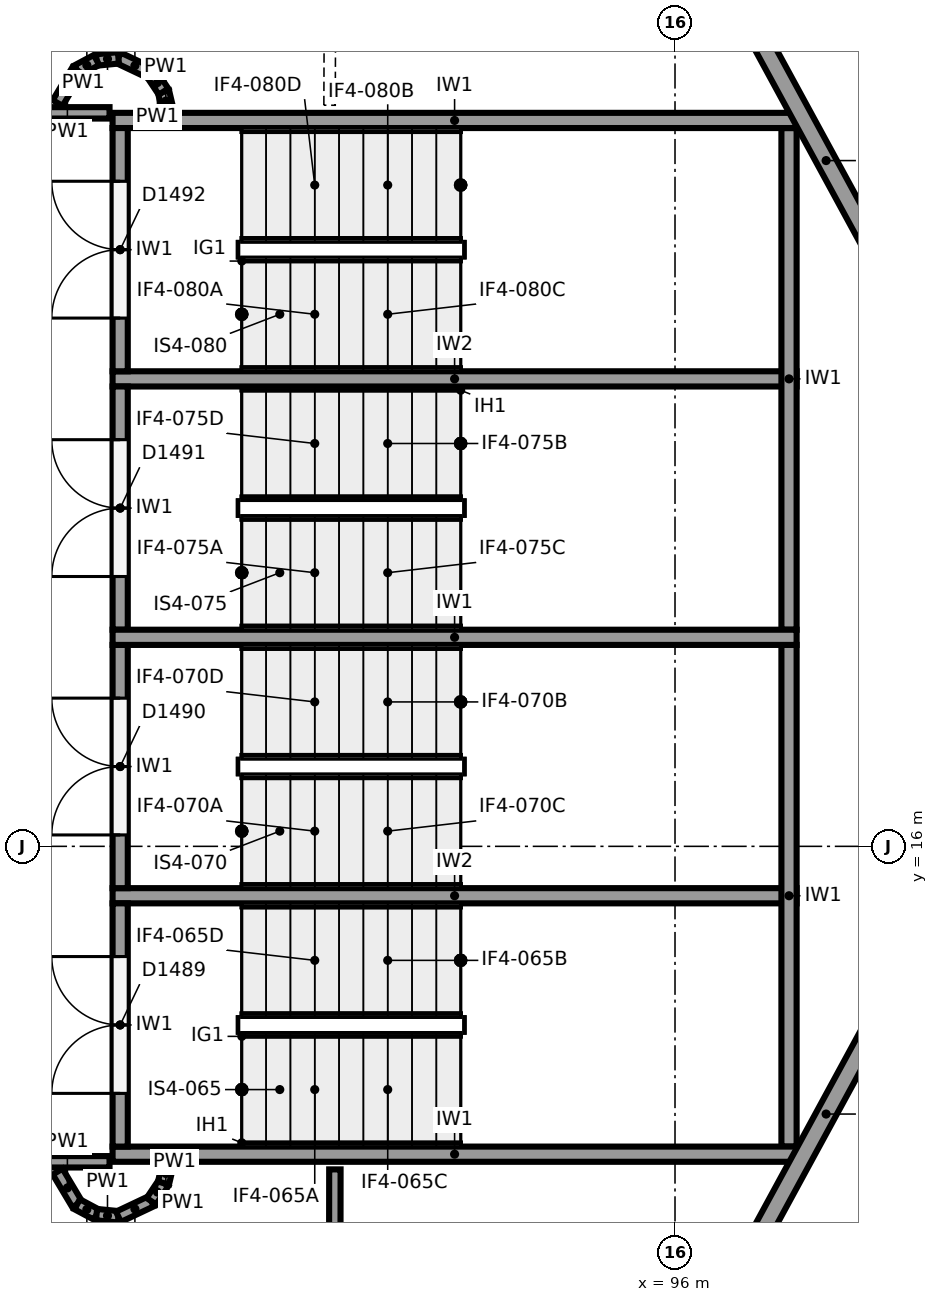
"""IFC4 building model, lengths in metres.
Left out: names, types, materials, properties, quantities, classifications, styles, units other than length and angle.
Written with IfcOpenShell. Run it as: python <this file> out.ifc"""

import sys

from ifc_helpers import new_model, si_unit, direction, frame, frame_2d, origin, place, context, subcontext, project, spatial, rectangle, extrude, element, fill, save


model = new_model("IFC4")
c1 = context("Model", 3, precision=1e-05, world=origin(), true_north=direction((0.0, 1.0)))
c2 = subcontext(c1, "Body", "Model", "MODEL_VIEW")
j1 = project(units=[si_unit("LENGTHUNIT", "METRE"), si_unit("PLANEANGLEUNIT", "RADIAN")], contexts=[c1])
p1 = place(None, origin())
s1 = spatial("IfcSite", under=j1, at=p1, CompositionType="ELEMENT")
p2 = place(p1, origin())
s2 = spatial("IfcBuilding", under=s1, at=p2, CompositionType="ELEMENT")
p3 = place(p2, frame((0.0, 0.0, 18.0)))
s3 = spatial("IfcBuildingStorey", under=s2, at=p3, CompositionType="ELEMENT", Elevation=18.0)
p4 = place(p3, frame((101.161, 18.311, 0.0), z_axis=(0.0, 0.0, 1.0), x_axis=(-0.477867771117, -0.878431780691, 0.0)))
e1 = element("IfcWall", 1, at=p4, inside=s3, PredefinedType="SOLIDWALL", context=c2, shape_type="SweptSolid", body=[
    extrude(rectangle(XDim=13.28, YDim=0.25, at=frame_2d((6.64, 0.0))), origin(), (0.0, 0.0, 1.0), 4.3),
])
p5 = place(p4, frame((11.63, 0.0, 1.0)))
e2 = element("IfcOpeningElement", 2, at=p5, cuts=e1, PredefinedType="OPENING", context=c2, shape_type="SweptSolid", body=[
    extrude(rectangle(XDim=0.9, YDim=3.25, at=frame_2d((0.45, 1.625))), frame((0.0, 0.135, 0.0), z_axis=(0.0, -1.0, 0.0), x_axis=(1.0, 0.0, 0.0)), (0.0, 0.0, 1.0), 0.27),
])
p6 = place(p4, frame((9.53, 0.0, 1.0)))
e3 = element("IfcOpeningElement", 3, at=p6, cuts=e1, PredefinedType="OPENING", context=c2, shape_type="SweptSolid", body=[
    extrude(rectangle(XDim=0.9, YDim=3.25, at=frame_2d((0.45, 1.625))), frame((0.0, 0.135, 0.0), z_axis=(0.0, -1.0, 0.0), x_axis=(1.0, 0.0, 0.0)), (0.0, 0.0, 1.0), 0.27),
])
p7 = place(p4, frame((1.13, 0.0, 1.0)))
e4 = element("IfcOpeningElement", 4, at=p7, cuts=e1, PredefinedType="OPENING", context=c2, shape_type="SweptSolid", body=[
    extrude(rectangle(XDim=0.9, YDim=3.25, at=frame_2d((0.45, 1.625))), frame((0.0, 0.135, 0.0), z_axis=(0.0, -1.0, 0.0), x_axis=(1.0, 0.0, 0.0)), (0.0, 0.0, 1.0), 0.27),
])
p8 = place(p3, frame((94.815, 30.855, 0.0), z_axis=(0.0, 0.0, 1.0), x_axis=(0.477867771117, -0.878431780691, 0.0)))
e5 = element("IfcWall", 5, at=p8, inside=s3, PredefinedType="SOLIDWALL", context=c2, shape_type="SweptSolid", body=[
    extrude(rectangle(XDim=13.28, YDim=0.25, at=frame_2d((6.64, 0.0))), origin(), (0.0, 0.0, 1.0), 4.3),
])
p9 = place(p8, frame((0.75, 0.0, 1.0)))
e6 = element("IfcOpeningElement", 6, at=p9, cuts=e5, PredefinedType="OPENING", context=c2, shape_type="SweptSolid", body=[
    extrude(rectangle(XDim=0.9, YDim=3.25, at=frame_2d((0.45, 1.625))), frame((0.0, 0.135, 0.0), z_axis=(0.0, -1.0, 0.0), x_axis=(1.0, 0.0, 0.0)), (0.0, 0.0, 1.0), 0.27),
])
p10 = place(p8, frame((2.85, 0.0, 1.0)))
e7 = element("IfcOpeningElement", 7, at=p10, cuts=e5, PredefinedType="OPENING", context=c2, shape_type="SweptSolid", body=[
    extrude(rectangle(XDim=0.9, YDim=3.25, at=frame_2d((0.45, 1.625))), frame((0.0, 0.135, 0.0), z_axis=(0.0, -1.0, 0.0), x_axis=(1.0, 0.0, 0.0)), (0.0, 0.0, 1.0), 0.27),
])
p11 = place(p8, frame((11.25, 0.0, 1.0)))
e8 = element("IfcOpeningElement", 8, at=p11, cuts=e5, PredefinedType="OPENING", context=c2, shape_type="SweptSolid", body=[
    extrude(rectangle(XDim=0.9, YDim=3.25, at=frame_2d((0.45, 1.625))), frame((0.0, 0.135, 0.0), z_axis=(0.0, -1.0, 0.0), x_axis=(1.0, 0.0, 0.0)), (0.0, 0.0, 1.0), 0.27),
])
for number, where, z_axis, x_axis in (
    (9, (97.6, 11.95, 0.0), (0.0, 0.0, 1.0), (-1.0, 0.0, 0.0)),
    (10, (97.6, 18.75, 0.0), (0.0, 0.0, 1.0), (-1.0, 0.0, 0.0)),
    (11, (97.6, 25.55, 0.0), (0.0, 0.0, 1.0), (-1.0, 0.0, 0.0)),
):
    element("IfcWall", number, at=place(p3, frame(where, z_axis=z_axis, x_axis=x_axis)), inside=s3, PredefinedType="SHEAR", context=c2, shape_type="SweptSolid", body=[
        extrude(rectangle(XDim=9.0, YDim=0.2, at=frame_2d((4.5, 0.0))), origin(), (0.0, 0.0, 1.0), 5.6),
    ])
for number, where, z_axis, x_axis in (
    (12, (97.5, 12.05, 0.0), (0.0, 0.0, 1.0), (0.0, 1.0, 0.0)),
    (13, (97.5, 18.85, 0.0), (0.0, 0.0, 1.0), (0.0, 1.0, 0.0)),
):
    element("IfcWall", number, at=place(p3, frame(where, z_axis=z_axis, x_axis=x_axis)), inside=s3, PredefinedType="SHEAR", context=c2, shape_type="SweptSolid", body=[
        extrude(rectangle(XDim=6.6, YDim=0.2, at=frame_2d((3.3, 0.0))), origin(), (0.0, 0.0, 1.0), 5.6),
    ])
for number, where, z_axis, x_axis in (
    (14, (97.6, 15.35, 0.0), (0.0, 0.0, 1.0), (-1.0, 0.0, 0.0)),
    (15, (97.6, 22.15, 0.0), (0.0, 0.0, 1.0), (-1.0, 0.0, 0.0)),
):
    element("IfcWall", number, at=place(p3, frame(where, z_axis=z_axis, x_axis=x_axis)), inside=s3, PredefinedType="SHEAR", context=c2, shape_type="SweptSolid", body=[
        extrude(rectangle(XDim=9.0, YDim=0.2, at=frame_2d((4.5, 0.0))), origin(), (0.0, 0.0, 1.0), 5.6),
    ])
p12 = place(p3, frame((88.7, 12.05, 0.0), z_axis=(0.0, 0.0, 1.0), x_axis=(0.0, 1.0, 0.0)))
e16 = element("IfcWall", 16, at=p12, inside=s3, PredefinedType="SHEAR", context=c2, shape_type="SweptSolid", body=[
    extrude(rectangle(XDim=3.2, YDim=0.2, at=frame_2d((1.6, 0.0))), origin(), (0.0, 0.0, 1.0), 5.6),
])
p13 = place(p12, frame((0.7, 0.0, 0.0)))
e17 = element("IfcOpeningElement", 17, at=p13, cuts=e16, PredefinedType="OPENING", context=c2, shape_type="SweptSolid", body=[
    extrude(rectangle(XDim=1.8, YDim=2.1, at=frame_2d((0.9, 1.05))), frame((0.0, 0.11, 0.0), z_axis=(0.0, -1.0, 0.0), x_axis=(1.0, 0.0, 0.0)), (0.0, 0.0, 1.0), 0.22),
])
p14 = place(p3, frame((88.7, 15.45, 0.0), z_axis=(0.0, 0.0, 1.0), x_axis=(0.0, 1.0, 0.0)))
e18 = element("IfcWall", 18, at=p14, inside=s3, PredefinedType="SHEAR", context=c2, shape_type="SweptSolid", body=[
    extrude(rectangle(XDim=3.2, YDim=0.2, at=frame_2d((1.6, 0.0))), origin(), (0.0, 0.0, 1.0), 5.6),
])
p15 = place(p14, frame((0.7, 0.0, 0.0)))
e19 = element("IfcOpeningElement", 19, at=p15, cuts=e18, PredefinedType="OPENING", context=c2, shape_type="SweptSolid", body=[
    extrude(rectangle(XDim=1.8, YDim=2.1, at=frame_2d((0.9, 1.05))), frame((0.0, 0.11, 0.0), z_axis=(0.0, -1.0, 0.0), x_axis=(1.0, 0.0, 0.0)), (0.0, 0.0, 1.0), 0.22),
])
p16 = place(p3, frame((88.7, 18.85, 0.0), z_axis=(0.0, 0.0, 1.0), x_axis=(0.0, 1.0, 0.0)))
e20 = element("IfcWall", 20, at=p16, inside=s3, PredefinedType="SHEAR", context=c2, shape_type="SweptSolid", body=[
    extrude(rectangle(XDim=3.2, YDim=0.2, at=frame_2d((1.6, 0.0))), origin(), (0.0, 0.0, 1.0), 5.6),
])
p17 = place(p16, frame((0.7, 0.0, 0.0)))
e21 = element("IfcOpeningElement", 21, at=p17, cuts=e20, PredefinedType="OPENING", context=c2, shape_type="SweptSolid", body=[
    extrude(rectangle(XDim=1.8, YDim=2.1, at=frame_2d((0.9, 1.05))), frame((0.0, 0.11, 0.0), z_axis=(0.0, -1.0, 0.0), x_axis=(1.0, 0.0, 0.0)), (0.0, 0.0, 1.0), 0.22),
])
p18 = place(p3, frame((88.7, 22.25, 0.0), z_axis=(0.0, 0.0, 1.0), x_axis=(0.0, 1.0, 0.0)))
e22 = element("IfcWall", 22, at=p18, inside=s3, PredefinedType="SHEAR", context=c2, shape_type="SweptSolid", body=[
    extrude(rectangle(XDim=3.2, YDim=0.2, at=frame_2d((1.6, 0.0))), origin(), (0.0, 0.0, 1.0), 5.6),
])
p19 = place(p18, frame((0.7, 0.0, 0.0)))
e23 = element("IfcOpeningElement", 23, at=p19, cuts=e22, PredefinedType="OPENING", context=c2, shape_type="SweptSolid", body=[
    extrude(rectangle(XDim=1.8, YDim=2.1, at=frame_2d((0.9, 1.05))), frame((0.0, 0.11, 0.0), z_axis=(0.0, -1.0, 0.0), x_axis=(1.0, 0.0, 0.0)), (0.0, 0.0, 1.0), 0.22),
])
p20 = place(p3, frame((85.577, 11.85, 0.0), z_axis=(0.0, 0.0, 1.0), x_axis=(1.0, 0.0, 0.0)))
e24 = element("IfcWall", 24, at=p20, inside=s3, PredefinedType="PARTITIONING", context=c2, shape_type="SweptSolid", body=[
    extrude(rectangle(XDim=2.983, YDim=0.15, at=frame_2d((1.491, 0.0))), origin(), (0.0, 0.0, 1.0), 5.6),
])
p21 = place(p3, frame((91.519, 6.967, 0.0), z_axis=(0.0, 0.0, 1.0), x_axis=(0.001174067593, 0.999999310782, 0.0)))
e25 = element("IfcWall", 25, at=p21, inside=s3, PredefinedType="PARTITIONING", context=c2, shape_type="SweptSolid", body=[
    extrude(rectangle(XDim=4.783, YDim=0.15, at=frame_2d((2.391, 0.0))), origin(), (0.0, 0.0, 1.0), 5.6),
])
p22 = place(p21, frame((1.833, 0.0, 0.0)))
e26 = element("IfcOpeningElement", 26, at=p22, cuts=e25, PredefinedType="OPENING", context=c2, shape_type="SweptSolid", body=[
    extrude(rectangle(XDim=1.0, YDim=2.1, at=frame_2d((0.5, 1.05))), frame((0.0, 0.085, 0.0), z_axis=(0.0, -1.0, 0.0), x_axis=(1.0, 0.0, 0.0)), (0.0, 0.0, 1.0), 0.17),
])
p23 = place(p3, frame((88.56, 25.65, 0.0), z_axis=(0.0, 0.0, 1.0), x_axis=(-1.0, 0.0, 0.0)))
e27 = element("IfcWall", 27, at=p23, inside=s3, PredefinedType="PARTITIONING", context=c2, shape_type="SweptSolid", body=[
    extrude(rectangle(XDim=2.983, YDim=0.15, at=frame_2d((1.491, 0.0))), origin(), (0.0, 0.0, 1.0), 5.6),
])
p24 = place(p23, frame((0.95, 0.0, 0.0)))
e28 = element("IfcOpeningElement", 28, at=p24, cuts=e27, PredefinedType="OPENING", context=c2, shape_type="SweptSolid", body=[
    extrude(rectangle(XDim=1.0, YDim=2.1, at=frame_2d((0.5, 1.05))), frame((0.0, 0.085, 0.0), z_axis=(0.0, -1.0, 0.0), x_axis=(1.0, 0.0, 0.0)), (0.0, 0.0, 1.0), 0.17),
])
p25 = place(p3, frame((91.455, 25.75, 0.0), z_axis=(0.0, 0.0, 1.0), x_axis=(0.003887189456, 0.999992444851, 0.0)))
e29 = element("IfcWall", 29, at=p25, inside=s3, PredefinedType="PARTITIONING", context=c2, shape_type="SweptSolid", body=[
    extrude(rectangle(XDim=4.71, YDim=0.15, at=frame_2d((2.355, 0.0))), origin(), (0.0, 0.0, 1.0), 5.6),
])
p26 = place(p25, frame((1.76, 0.0, 0.0)))
e30 = element("IfcOpeningElement", 30, at=p26, cuts=e29, PredefinedType="OPENING", context=c2, shape_type="SweptSolid", body=[
    extrude(rectangle(XDim=1.0, YDim=2.1, at=frame_2d((0.5, 1.05))), frame((0.0, 0.085, 0.0), z_axis=(0.0, -1.0, 0.0), x_axis=(1.0, 0.0, 0.0)), (0.0, 0.0, 1.0), 0.17),
])
p27 = place(p3, frame((87.877, 11.721, 0.0), z_axis=(0.0, 0.0, 1.0), x_axis=(0.513060623194, -0.858352373404, 0.0)))
e31 = element("IfcWall", 31, at=p27, inside=s3, PredefinedType="PARTITIONING", context=c2, shape_type="SweptSolid", body=[
    extrude(rectangle(XDim=0.5, YDim=0.15, at=frame_2d((0.25, 0.0))), origin(), (0.0, 0.0, 1.0), 5.6),
])
for number, where, z_axis, x_axis in (
    (32, (88.134, 11.291, 0.0), (0.0, 0.0, 1.0), (0.882, -0.472, 0.0)),
    (33, (88.389, 11.155, 0.0), (0.0, 0.0, 1.0), (0.995, -0.098, 0.0)),
):
    element("IfcWall", number, at=place(p3, frame(where, z_axis=z_axis, x_axis=x_axis)), inside=s3, PredefinedType="PARTITIONING", context=c2, shape_type="SweptSolid", body=[
        extrude(rectangle(XDim=0.289, YDim=0.15, at=frame_2d((0.145, 0.0))), origin(), (0.0, 0.0, 1.0), 5.6),
    ])
p28 = place(p3, frame((88.677, 11.126, 0.0), z_axis=(0.0, 0.0, 1.0), x_axis=(0.90398642908, 0.427561148889, 0.0)))
e34 = element("IfcWall", 34, at=p28, inside=s3, PredefinedType="PARTITIONING", context=c2, shape_type="SweptSolid", body=[
    extrude(rectangle(XDim=0.48, YDim=0.15, at=frame_2d((0.24, 0.0))), origin(), (0.0, 0.0, 1.0), 5.6),
])
p29 = place(p3, frame((89.111, 11.332, 0.0), z_axis=(0.0, 0.0, 1.0), x_axis=(0.555678694372, 0.831397130511, 0.0)))
e35 = element("IfcWall", 35, at=p29, inside=s3, PredefinedType="PARTITIONING", context=c2, shape_type="SweptSolid", body=[
    extrude(rectangle(XDim=0.288, YDim=0.15, at=frame_2d((0.144, 0.0))), origin(), (0.0, 0.0, 1.0), 5.6),
])
for number, where, z_axis, x_axis in (
    (36, (89.271, 11.571, 0.0), (0.0, 0.0, 1.0), (0.23, 0.973, 0.0)),
    (37, (89.33, 25.678, 0.0), (0.0, 0.0, 1.0), (-0.23, 0.973, 0.0)),
):
    element("IfcWall", number, at=place(p3, frame(where, z_axis=z_axis, x_axis=x_axis)), inside=s3, PredefinedType="PARTITIONING", context=c2, shape_type="SweptSolid", body=[
        extrude(rectangle(XDim=0.258, YDim=0.15, at=frame_2d((0.129, 0.0))), origin(), (0.0, 0.0, 1.0), 5.6),
    ])
p30 = place(p3, frame((89.271, 25.929, 0.0), z_axis=(0.0, 0.0, 1.0), x_axis=(-0.555678694372, 0.831397130511, 0.0)))
e38 = element("IfcWall", 38, at=p30, inside=s3, PredefinedType="PARTITIONING", context=c2, shape_type="SweptSolid", body=[
    extrude(rectangle(XDim=0.288, YDim=0.15, at=frame_2d((0.144, 0.0))), origin(), (0.0, 0.0, 1.0), 5.6),
])
p31 = place(p3, frame((89.111, 26.168, 0.0), z_axis=(0.0, 0.0, 1.0), x_axis=(-0.90398642908, 0.427561148889, 0.0)))
e39 = element("IfcWall", 39, at=p31, inside=s3, PredefinedType="PARTITIONING", context=c2, shape_type="SweptSolid", body=[
    extrude(rectangle(XDim=0.48, YDim=0.15, at=frame_2d((0.24, 0.0))), origin(), (0.0, 0.0, 1.0), 5.6),
])
for number, where, z_axis, x_axis in (
    (40, (88.677, 26.374, 0.0), (0.0, 0.0, 1.0), (-0.995, -0.098, 0.0)),
    (41, (88.389, 26.345, 0.0), (0.0, 0.0, 1.0), (-0.882, -0.472, 0.0)),
):
    element("IfcWall", number, at=place(p3, frame(where, z_axis=z_axis, x_axis=x_axis)), inside=s3, PredefinedType="PARTITIONING", context=c2, shape_type="SweptSolid", body=[
        extrude(rectangle(XDim=0.289, YDim=0.15, at=frame_2d((0.145, 0.0))), origin(), (0.0, 0.0, 1.0), 5.6),
    ])
p32 = place(p3, frame((88.134, 26.209, 0.0), z_axis=(0.0, 0.0, 1.0), x_axis=(-0.513060623194, -0.858352373404, 0.0)))
e42 = element("IfcWall", 42, at=p32, inside=s3, PredefinedType="PARTITIONING", context=c2, shape_type="SweptSolid", body=[
    extrude(rectangle(XDim=0.5, YDim=0.15, at=frame_2d((0.25, 0.0))), origin(), (0.0, 0.0, 1.0), 5.6),
])
p33 = place(p13, origin())
e43 = element("IfcDoor", 43, at=p33, inside=s3, OperationType="DOUBLE_DOOR_SINGLE_SWING", PredefinedType="DOOR", context=c2, shape_type="SweptSolid", body=[
    extrude(rectangle(XDim=1.8, YDim=2.1, at=frame_2d((0.9, 1.05))), frame((0.0, 0.025, 0.0), z_axis=(0.0, -1.0, 0.0), x_axis=(1.0, 0.0, 0.0)), (0.0, 0.0, 1.0), 0.05),
])
fill(e17, e43)
p34 = place(p15, origin())
e44 = element("IfcDoor", 44, at=p34, inside=s3, OperationType="DOUBLE_DOOR_SINGLE_SWING", PredefinedType="DOOR", context=c2, shape_type="SweptSolid", body=[
    extrude(rectangle(XDim=1.8, YDim=2.1, at=frame_2d((0.9, 1.05))), frame((0.0, 0.025, 0.0), z_axis=(0.0, -1.0, 0.0), x_axis=(1.0, 0.0, 0.0)), (0.0, 0.0, 1.0), 0.05),
])
fill(e19, e44)
p35 = place(p17, origin())
e45 = element("IfcDoor", 45, at=p35, inside=s3, OperationType="DOUBLE_DOOR_SINGLE_SWING", PredefinedType="DOOR", context=c2, shape_type="SweptSolid", body=[
    extrude(rectangle(XDim=1.8, YDim=2.1, at=frame_2d((0.9, 1.05))), frame((0.0, 0.025, 0.0), z_axis=(0.0, -1.0, 0.0), x_axis=(1.0, 0.0, 0.0)), (0.0, 0.0, 1.0), 0.05),
])
fill(e21, e45)
p36 = place(p19, origin())
e46 = element("IfcDoor", 46, at=p36, inside=s3, OperationType="DOUBLE_DOOR_SINGLE_SWING", PredefinedType="DOOR", context=c2, shape_type="SweptSolid", body=[
    extrude(rectangle(XDim=1.8, YDim=2.1, at=frame_2d((0.9, 1.05))), frame((0.0, 0.025, 0.0), z_axis=(0.0, -1.0, 0.0), x_axis=(1.0, 0.0, 0.0)), (0.0, 0.0, 1.0), 0.05),
])
fill(e23, e46)
save(model, sys.argv[1])
